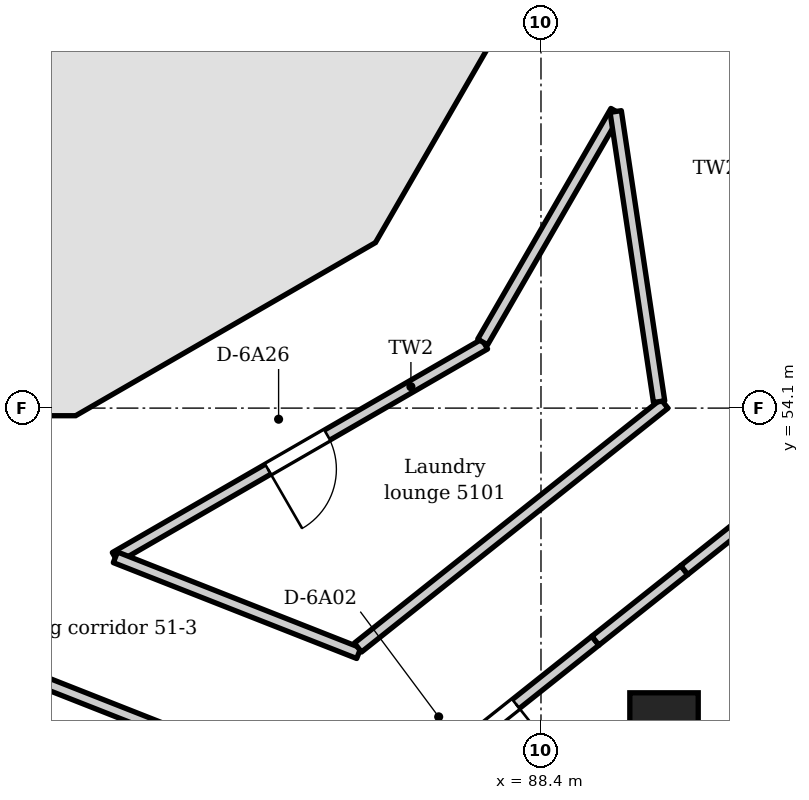
"""IFC4 building model, lengths in metres.
Left out: names, types, materials, properties, quantities, classifications, styles, units other than length and angle.
Written with IfcOpenShell. Run it as: python <this file> out.ifc"""

import sys

from ifc_helpers import new_model, si_unit, direction, frame, frame_2d, origin, origin_2d, place, context, subcontext, project, spatial, polyline, rectangle, circle, outline, extrude, element, fill, save


model = new_model("IFC4")
c1 = context("Model", 3, precision=1e-05, world=origin(), true_north=direction((0.0, 1.0)))
c2 = subcontext(c1, "Body", "Model", "MODEL_VIEW")
j1 = project(units=[si_unit("LENGTHUNIT", "METRE"), si_unit("PLANEANGLEUNIT", "RADIAN")], contexts=[c1])
p1 = place(None, origin())
s1 = spatial("IfcSite", under=j1, at=p1, CompositionType="ELEMENT")
p2 = place(p1, origin())
s2 = spatial("IfcBuilding", under=s1, at=p2, CompositionType="ELEMENT")
p3 = place(p2, frame((0.0, 0.0, 198.0)))
s3 = spatial("IfcBuildingStorey", under=s2, at=p3, CompositionType="ELEMENT", Elevation=198.0)
p4 = place(p3, frame((77.722, 54.35, 0.0), z_axis=(0.0, 0.0, 1.0), x_axis=(1.0, 0.0, 0.0)))
e1 = element("IfcWall", 1, at=p4, inside=s3, PredefinedType="SHEAR", context=c2, shape_type="SweptSolid", body=[
    extrude(outline(polyline([(0.0, -0.35), (4.555, -0.35), (4.368, 0.35), (0.188, 0.35), (0.0, -0.35)])), origin(), (0.0, 0.0, 1.0), 3.6),
])
p5 = place(p4, frame((1.278, 0.0, 0.0)))
e2 = element("IfcOpeningElement", 2, at=p5, cuts=e1, PredefinedType="OPENING", context=c2, shape_type="SweptSolid", body=[
    extrude(rectangle(XDim=2.0, YDim=2.1, at=frame_2d((1.0, 1.05))), frame((0.0, 0.36, 0.0), z_axis=(0.0, -1.0, 0.0), x_axis=(1.0, 0.0, 0.0)), (0.0, 0.0, 1.0), 0.72),
])
p6 = place(p3, frame((82.103, 54.303, 0.0), z_axis=(0.0, 0.0, 1.0), x_axis=(0.866034756103, 0.499983800959, 0.0)))
e3 = element("IfcWall", 3, at=p6, inside=s3, PredefinedType="SHEAR", context=c2, shape_type="SweptSolid", body=[
    extrude(outline(polyline([(0.0, -0.35), (4.555, -0.35), (4.368, 0.35), (0.188, 0.35), (0.0, -0.35)])), origin(), (0.0, 0.0, 1.0), 3.6),
])
p7 = place(p3, frame((85.919, 56.452, 0.0), z_axis=(0.0, 0.0, 1.0), x_axis=(0.499983800959, 0.866034756103, 0.0)))
e4 = element("IfcWall", 4, at=p7, inside=s3, PredefinedType="SHEAR", context=c2, shape_type="SweptSolid", body=[
    extrude(outline(polyline([(0.0, -0.35), (4.555, -0.35), (4.368, 0.35), (0.188, 0.35), (0.0, -0.35)])), origin(), (0.0, 0.0, 1.0), 3.6),
])
p8 = place(p7, frame((1.577, 0.0, 0.0)))
e5 = element("IfcOpeningElement", 5, at=p8, cuts=e4, PredefinedType="OPENING", context=c2, shape_type="SweptSolid", body=[
    extrude(rectangle(XDim=1.4, YDim=2.1, at=frame_2d((0.7, 1.05))), frame((0.0, 0.36, 0.0), z_axis=(0.0, -1.0, 0.0), x_axis=(1.0, 0.0, 0.0)), (0.0, 0.0, 1.0), 0.72),
])
p9 = place(p3, frame((80.225, 60.552, 0.0), z_axis=(0.0, 0.0, 1.0), x_axis=(0.866009627307, -0.500027324665, 0.0)))
e6 = element("IfcWall", 6, at=p9, inside=s3, PredefinedType="SHEAR", context=c2, shape_type="SweptSolid", body=[
    extrude(rectangle(XDim=6.632, YDim=0.3, at=frame_2d((3.316, 0.0))), origin(), (0.0, 0.0, 1.0), 3.6),
])
p10 = place(p3, frame((90.019, 49.905, -0.35), z_axis=(0.0, 0.0, 1.0), x_axis=(1.0, 0.0, 0.0)))
e7 = element("IfcColumn", 7, at=p10, inside=s3, PredefinedType="COLUMN", context=c2, shape_type="SweptSolid", body=[
    extrude(circle(Radius=0.45, at=origin_2d()), origin(), (0.0, 0.0, 1.0), 3.95),
])
p11 = place(p3, frame((92.514, 40.454, 0.0), z_axis=(0.0, 0.0, 1.0), x_axis=(-0.930417922313, 0.3665003272, 0.0)))
e8 = element("IfcWall", 8, at=p11, inside=s3, PredefinedType="SOLIDWALL", context=c2, shape_type="SweptSolid", body=[
    extrude(outline(polyline([(0.149, 0.075), (0.149, -0.075), (39.297, -0.075), (39.297, 0.075), (0.149, 0.075)])), origin(), (0.0, 0.0, 1.0), 3.3),
])
p12 = place(p11, frame((1.193, 0.0, 0.0)))
e9 = element("IfcOpeningElement", 9, at=p12, cuts=e8, PredefinedType="OPENING", context=c2, shape_type="SweptSolid", body=[
    extrude(rectangle(XDim=1.8, YDim=2.6, at=frame_2d((0.9, 1.3))), frame((0.0, 0.085, 0.0), z_axis=(0.0, -1.0, 0.0), x_axis=(1.0, 0.0, 0.0)), (0.0, 0.0, 1.0), 0.17),
])
p13 = place(p11, frame((4.479, 0.0, 0.0)))
e10 = element("IfcOpeningElement", 10, at=p13, cuts=e8, PredefinedType="OPENING", context=c2, shape_type="SweptSolid", body=[
    extrude(rectangle(XDim=1.8, YDim=2.6, at=frame_2d((0.9, 1.3))), frame((0.0, 0.085, 0.0), z_axis=(0.0, -1.0, 0.0), x_axis=(1.0, 0.0, 0.0)), (0.0, 0.0, 1.0), 0.17),
])
p14 = place(p11, frame((8.065, 0.0, 0.0)))
e11 = element("IfcOpeningElement", 11, at=p14, cuts=e8, PredefinedType="OPENING", context=c2, shape_type="SweptSolid", body=[
    extrude(rectangle(XDim=1.8, YDim=2.6, at=frame_2d((0.9, 1.3))), frame((0.0, 0.085, 0.0), z_axis=(0.0, -1.0, 0.0), x_axis=(1.0, 0.0, 0.0)), (0.0, 0.0, 1.0), 0.17),
])
p15 = place(p11, frame((11.651, 0.0, 0.0)))
e12 = element("IfcOpeningElement", 12, at=p15, cuts=e8, PredefinedType="OPENING", context=c2, shape_type="SweptSolid", body=[
    extrude(rectangle(XDim=1.8, YDim=2.6, at=frame_2d((0.9, 1.3))), frame((0.0, 0.085, 0.0), z_axis=(0.0, -1.0, 0.0), x_axis=(1.0, 0.0, 0.0)), (0.0, 0.0, 1.0), 0.17),
])
p16 = place(p11, frame((15.237, 0.0, 0.0)))
e13 = element("IfcOpeningElement", 13, at=p16, cuts=e8, PredefinedType="OPENING", context=c2, shape_type="SweptSolid", body=[
    extrude(rectangle(XDim=1.8, YDim=2.6, at=frame_2d((0.9, 1.3))), frame((0.0, 0.085, 0.0), z_axis=(0.0, -1.0, 0.0), x_axis=(1.0, 0.0, 0.0)), (0.0, 0.0, 1.0), 0.17),
])
p17 = place(p11, frame((18.823, 0.0, 0.0)))
e14 = element("IfcOpeningElement", 14, at=p17, cuts=e8, PredefinedType="OPENING", context=c2, shape_type="SweptSolid", body=[
    extrude(rectangle(XDim=1.8, YDim=2.6, at=frame_2d((0.9, 1.3))), frame((0.0, 0.085, 0.0), z_axis=(0.0, -1.0, 0.0), x_axis=(1.0, 0.0, 0.0)), (0.0, 0.0, 1.0), 0.17),
])
p18 = place(p11, frame((22.409, 0.0, 0.0)))
e15 = element("IfcOpeningElement", 15, at=p18, cuts=e8, PredefinedType="OPENING", context=c2, shape_type="SweptSolid", body=[
    extrude(rectangle(XDim=1.8, YDim=2.6, at=frame_2d((0.9, 1.3))), frame((0.0, 0.085, 0.0), z_axis=(0.0, -1.0, 0.0), x_axis=(1.0, 0.0, 0.0)), (0.0, 0.0, 1.0), 0.17),
])
p19 = place(p11, frame((25.995, 0.0, 0.0)))
e16 = element("IfcOpeningElement", 16, at=p19, cuts=e8, PredefinedType="OPENING", context=c2, shape_type="SweptSolid", body=[
    extrude(rectangle(XDim=1.8, YDim=2.6, at=frame_2d((0.9, 1.3))), frame((0.0, 0.085, 0.0), z_axis=(0.0, -1.0, 0.0), x_axis=(1.0, 0.0, 0.0)), (0.0, 0.0, 1.0), 0.17),
])
p20 = place(p11, frame((29.581, 0.0, 0.0)))
e17 = element("IfcOpeningElement", 17, at=p20, cuts=e8, PredefinedType="OPENING", context=c2, shape_type="SweptSolid", body=[
    extrude(rectangle(XDim=1.8, YDim=2.6, at=frame_2d((0.9, 1.3))), frame((0.0, 0.085, 0.0), z_axis=(0.0, -1.0, 0.0), x_axis=(1.0, 0.0, 0.0)), (0.0, 0.0, 1.0), 0.17),
])
p21 = place(p11, frame((33.167, 0.0, 0.0)))
e18 = element("IfcOpeningElement", 18, at=p21, cuts=e8, PredefinedType="OPENING", context=c2, shape_type="SweptSolid", body=[
    extrude(rectangle(XDim=1.8, YDim=2.6, at=frame_2d((0.9, 1.3))), frame((0.0, 0.085, 0.0), z_axis=(0.0, -1.0, 0.0), x_axis=(1.0, 0.0, 0.0)), (0.0, 0.0, 1.0), 0.17),
])
p22 = place(p11, frame((36.453, 0.0, 0.0)))
e19 = element("IfcOpeningElement", 19, at=p22, cuts=e8, PredefinedType="OPENING", context=c2, shape_type="SweptSolid", body=[
    extrude(rectangle(XDim=1.8, YDim=2.6, at=frame_2d((0.9, 1.3))), frame((0.0, 0.085, 0.0), z_axis=(0.0, -1.0, 0.0), x_axis=(1.0, 0.0, 0.0)), (0.0, 0.0, 1.0), 0.17),
])
p23 = place(p3, frame((77.891, 52.056, 0.0), z_axis=(0.0, 0.0, 1.0), x_axis=(0.930403660154, -0.366536531837, 0.0)))
e20 = element("IfcWall", 20, at=p23, inside=s3, PredefinedType="PARTITIONING", context=c2, shape_type="SweptSolid", body=[
    extrude(rectangle(XDim=9.062, YDim=0.15, at=frame_2d((4.531, 0.0))), origin(), (0.0, 0.0, 1.0), 3.3),
])
p24 = place(p23, frame((0.15, 0.0, 0.0)))
e21 = element("IfcOpeningElement", 21, at=p24, cuts=e20, PredefinedType="OPENING", context=c2, shape_type="SweptSolid", body=[
    extrude(rectangle(XDim=1.0, YDim=2.1, at=frame_2d((0.5, 1.05))), frame((0.0, 0.085, 0.0), z_axis=(0.0, -1.0, 0.0), x_axis=(1.0, 0.0, 0.0)), (0.0, 0.0, 1.0), 0.17),
])
p25 = place(p3, frame((82.798, 52.135, 0.0), z_axis=(0.0, 0.0, 1.0), x_axis=(0.865994393525, 0.500053707499, 0.0)))
e22 = element("IfcWall", 22, at=p25, inside=s3, PredefinedType="PARTITIONING", context=c2, shape_type="SweptSolid", body=[
    extrude(rectangle(XDim=5.614, YDim=0.15, at=frame_2d((2.807, 0.0))), origin(), (0.0, 0.0, 1.0), 2.8),
])
p26 = place(p25, frame((2.322, 0.0, 0.0)))
e23 = element("IfcOpeningElement", 23, at=p26, cuts=e22, PredefinedType="OPENING", context=c2, shape_type="SweptSolid", body=[
    extrude(rectangle(XDim=0.9, YDim=2.1, at=frame_2d((0.45, 1.05))), frame((0.0, 0.085, 0.0), z_axis=(0.0, -1.0, 0.0), x_axis=(1.0, 0.0, 0.0)), (0.0, 0.0, 1.0), 0.17),
])
p27 = place(p3, frame((82.801, 52.137, 0.0), z_axis=(0.0, 0.0, 1.0), x_axis=(0.930387129981, -0.366578488685, 0.0)))
e24 = element("IfcWall", 24, at=p27, inside=s3, PredefinedType="PARTITIONING", context=c2, shape_type="SweptSolid", body=[
    extrude(rectangle(XDim=3.441, YDim=0.15, at=frame_2d((1.721, 0.0))), origin(), (0.0, 0.0, 1.0), 3.3),
])
p28 = place(p3, frame((85.992, 50.95, 0.0), z_axis=(0.0, 0.0, 1.0), x_axis=(0.782530221945, 0.622612601657, 0.0)))
e25 = element("IfcWall", 25, at=p28, inside=s3, PredefinedType="PARTITIONING", context=c2, shape_type="SweptSolid", body=[
    extrude(rectangle(XDim=5.153, YDim=0.15, at=frame_2d((2.576, 0.0))), origin(), (0.0, 0.0, 1.0), 2.8),
])
p29 = place(p3, frame((86.312, 48.809, 0.0), z_axis=(0.0, 0.0, 1.0), x_axis=(0.782487894098, 0.622665797672, 0.0)))
e26 = element("IfcWall", 26, at=p29, inside=s3, PredefinedType="PARTITIONING", context=c2, shape_type="SweptSolid", body=[
    extrude(rectangle(XDim=3.584, YDim=0.15, at=frame_2d((1.792, 0.0))), origin(), (0.0, 0.0, 1.0), 2.8),
])
p30 = place(p29, frame((0.447, 0.0, 0.0)))
e27 = element("IfcOpeningElement", 27, at=p30, cuts=e26, PredefinedType="OPENING", context=c2, shape_type="SweptSolid", body=[
    extrude(rectangle(XDim=1.8, YDim=2.1, at=frame_2d((0.9, 1.05))), frame((0.0, 0.085, 0.0), z_axis=(0.0, -1.0, 0.0), x_axis=(1.0, 0.0, 0.0)), (0.0, 0.0, 1.0), 0.17),
])
p31 = place(p3, frame((87.633, 54.97, 0.0), z_axis=(0.0, 0.0, 1.0), x_axis=(0.50005009493, 0.865996479531, 0.0)))
e28 = element("IfcWall", 28, at=p31, inside=s3, PredefinedType="PARTITIONING", context=c2, shape_type="SweptSolid", body=[
    extrude(rectangle(XDim=3.505, YDim=0.15, at=frame_2d((1.752, 0.0))), origin(), (0.0, 0.0, 1.0), 3.3),
])
p32 = place(p3, frame((89.116, 51.04, 0.0), z_axis=(0.0, 0.0, 1.0), x_axis=(0.7828906441, 0.622159336007, 0.0)))
e29 = element("IfcWall", 29, at=p32, inside=s3, PredefinedType="PARTITIONING", context=c2, shape_type="SweptSolid", body=[
    extrude(rectangle(XDim=1.493, YDim=0.15, at=frame_2d((0.747, 0.0))), origin(), (0.0, 0.0, 1.0), 2.8),
])
p33 = place(p3, frame((89.383, 58.002, 0.0), z_axis=(0.0, 0.0, 1.0), x_axis=(0.14791043165, -0.989000760469, 0.0)))
e30 = element("IfcWall", 30, at=p33, inside=s3, PredefinedType="PARTITIONING", context=c2, shape_type="SweptSolid", body=[
    extrude(rectangle(XDim=3.859, YDim=0.15, at=frame_2d((1.93, 0.0))), origin(), (0.0, 0.0, 1.0), 3.3),
])
p34 = place(p3, frame((90.285, 51.969, 0.0), z_axis=(0.0, 0.0, 1.0), x_axis=(0.782471905859, 0.622685889145, 0.0)))
e31 = element("IfcWall", 31, at=p34, inside=s3, PredefinedType="PARTITIONING", context=c2, shape_type="SweptSolid", body=[
    extrude(rectangle(XDim=2.24, YDim=0.15, at=frame_2d((1.12, 0.0))), origin(), (0.0, 0.0, 1.0), 3.3),
])
p35 = place(p3, frame((90.628, 62.355, 0.0), z_axis=(0.0, 0.0, 1.0), x_axis=(0.147851766837, -0.989009532332, 0.0)))
e32 = element("IfcWall", 32, at=p35, inside=s3, PredefinedType="PARTITIONING", context=c2, shape_type="SweptSolid", body=[
    extrude(rectangle(XDim=9.064, YDim=0.15, at=frame_2d((4.532, 0.0))), origin(), (0.0, 0.0, 1.0), 3.3),
])
p36 = place(p35, frame((0.229, 0.0, 0.0)))
e33 = element("IfcOpeningElement", 33, at=p36, cuts=e32, PredefinedType="OPENING", context=c2, shape_type="SweptSolid", body=[
    extrude(rectangle(XDim=0.9, YDim=2.1, at=frame_2d((0.45, 1.05))), frame((0.0, 0.085, 0.0), z_axis=(0.0, -1.0, 0.0), x_axis=(1.0, 0.0, 0.0)), (0.0, 0.0, 1.0), 0.17),
])
p37 = place(p3, frame((81.3, 56.15, 0.0), z_axis=(0.0, 0.0, 1.0), x_axis=(1.0, 0.0, 0.0)))
e34 = element("IfcWall", 34, at=p37, inside=s3, PredefinedType="PARTITIONING", context=c2, shape_type="SweptSolid", body=[
    extrude(rectangle(XDim=2.4, YDim=0.2, at=frame_2d((1.2, 0.0))), origin(), (0.0, 0.0, 1.0), 3.3),
])
p38 = place(p3, frame((81.3, 58.35, 0.0), z_axis=(0.0, 0.0, 1.0), x_axis=(1.0, 0.0, 0.0)))
e35 = element("IfcWall", 35, at=p38, inside=s3, PredefinedType="PARTITIONING", context=c2, shape_type="SweptSolid", body=[
    extrude(rectangle(XDim=2.265, YDim=0.2, at=frame_2d((1.132, 0.0))), origin(), (0.0, 0.0, 1.0), 3.3),
])
p39 = place(p3, frame((83.8, 58.257, 0.0), z_axis=(0.0, 0.0, 1.0), x_axis=(0.0, -1.0, 0.0)))
e36 = element("IfcWall", 36, at=p39, inside=s3, PredefinedType="PARTITIONING", context=c2, shape_type="SweptSolid", body=[
    extrude(rectangle(XDim=2.207, YDim=0.2, at=frame_2d((1.104, 0.0))), origin(), (0.0, 0.0, 1.0), 3.3),
])
p40 = place(p30, frame((1.8, 0.0, 0.0), z_axis=(0.0, 0.0, 1.0), x_axis=(-1.0, 0.0, 0.0)))
e37 = element("IfcDoor", 37, at=p40, inside=s3, OperationType="DOUBLE_DOOR_DOUBLE_SWING", PredefinedType="DOOR", context=c2, shape_type="SweptSolid", body=[
    extrude(rectangle(XDim=1.8, YDim=2.1, at=frame_2d((0.9, 1.05))), frame((0.0, 0.025, 0.0), z_axis=(0.0, -1.0, 0.0), x_axis=(1.0, 0.0, 0.0)), (0.0, 0.0, 1.0), 0.05),
])
fill(e27, e37)
p41 = place(p26, frame((0.9, 0.0, 0.0), z_axis=(0.0, 0.0, 1.0), x_axis=(-1.0, 0.0, 0.0)))
e38 = element("IfcDoor", 38, at=p41, inside=s3, OperationType="SINGLE_SWING_RIGHT", PredefinedType="DOOR", context=c2, shape_type="SweptSolid", body=[
    extrude(rectangle(XDim=0.9, YDim=2.1, at=frame_2d((0.45, 1.05))), frame((0.0, 0.025, 0.0), z_axis=(0.0, -1.0, 0.0), x_axis=(1.0, 0.0, 0.0)), (0.0, 0.0, 1.0), 0.05),
])
fill(e23, e38)
p42 = place(p8, origin())
e39 = element("IfcDoor", 39, at=p42, inside=s3, OperationType="DOUBLE_DOOR_SINGLE_SWING", PredefinedType="DOOR", context=c2, shape_type="SweptSolid", body=[
    extrude(rectangle(XDim=1.4, YDim=2.1, at=frame_2d((0.7, 1.05))), frame((0.0, 0.025, 0.0), z_axis=(0.0, -1.0, 0.0), x_axis=(1.0, 0.0, 0.0)), (0.0, 0.0, 1.0), 0.05),
])
fill(e5, e39)
save(model, sys.argv[1])
